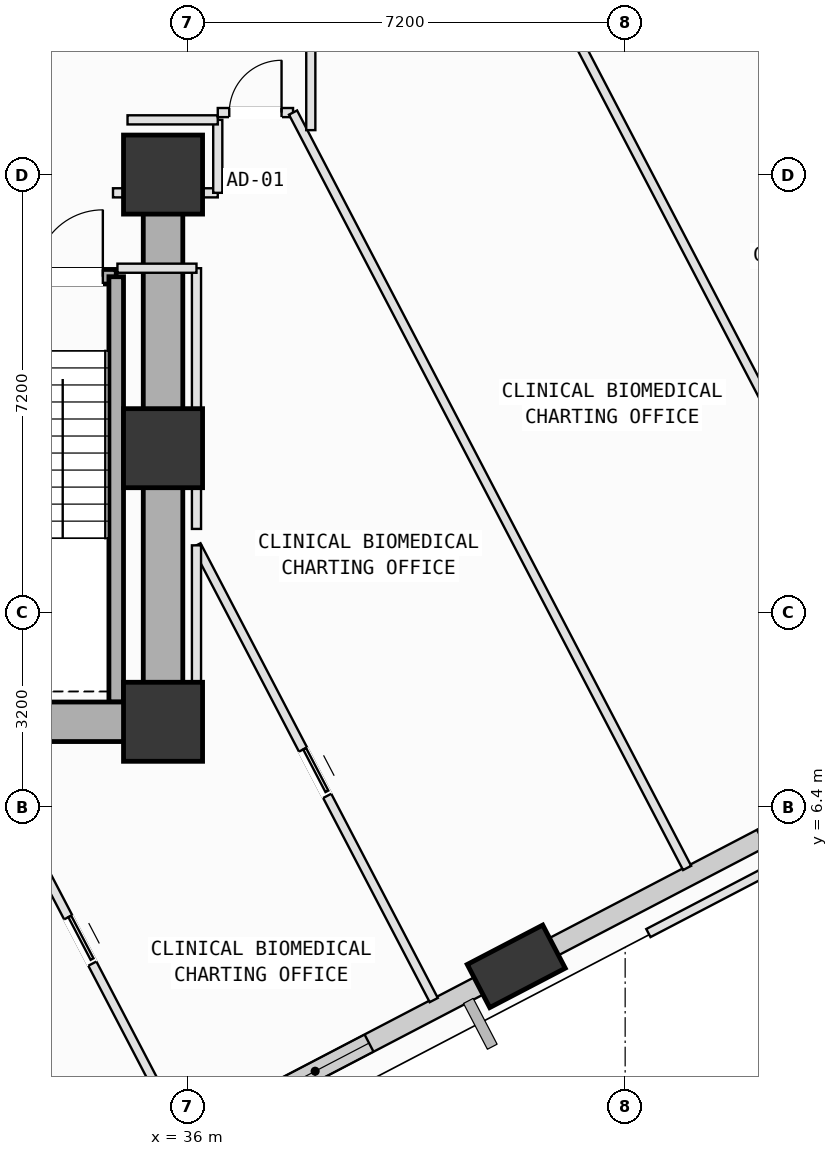
"""IFC4 building model, lengths in metres.
Left out: names, types, materials, properties, quantities, classifications, styles, units other than length and angle.
Written with IfcOpenShell. Run it as: python <this file> out.ifc"""

import sys

from ifc_helpers import new_model, si_unit, direction, frame, frame_2d, origin, origin_2d, place, context, subcontext, project, spatial, rectangle, extrude, element, fill, save


model = new_model("IFC4")
c1 = context("Model", 3, precision=1e-05, world=origin(), true_north=direction((0.0, 1.0)))
c2 = subcontext(c1, "Body", "Model", "MODEL_VIEW")
j1 = project(units=[si_unit("LENGTHUNIT", "METRE"), si_unit("PLANEANGLEUNIT", "RADIAN")], contexts=[c1])
p1 = place(None, origin())
s1 = spatial("IfcSite", under=j1, at=p1, CompositionType="ELEMENT")
p2 = place(p1, origin())
s2 = spatial("IfcBuilding", under=s1, at=p2, CompositionType="ELEMENT")
p3 = place(p2, frame((0.0, 0.0, 140.4)))
s3 = spatial("IfcBuildingStorey", under=s2, at=p3, CompositionType="ELEMENT", Elevation=140.4)
for number, where, z_axis, x_axis in (
    (1, (35.6, 7.8, 0.0), (0.0, 0.0, 1.0), (1.0, 0.0, 0.0)),
    (2, (35.6, 12.3, 0.0), (0.0, 0.0, 1.0), (1.0, 0.0, 0.0)),
    (3, (35.6, 16.8, 0.0), (0.0, 0.0, 1.0), (1.0, 0.0, 0.0)),
):
    element("IfcColumn", number, at=place(p3, frame(where, z_axis=z_axis, x_axis=x_axis)), inside=s3, PredefinedType="COLUMN", context=c2, shape_type="SweptSolid", body=[
        extrude(rectangle(XDim=1.3, YDim=1.3, at=origin_2d()), origin(), (0.0, 0.0, 1.0), 4.0),
    ])
p4 = place(p3, frame((41.409, 3.778, 0.002), z_axis=(0.086534580575, 0.032944951033, 0.995703970348), x_axis=(-0.745854703715, 0.664730498128, 0.042826694996)))
e4 = element("IfcColumn", 4, at=p4, inside=s3, PredefinedType="COLUMN", context=c2, shape_type="SweptSolid", body=[
    extrude(rectangle(XDim=1.4, YDim=0.8, at=origin_2d()), origin(), (0.0, 0.0, 1.0), 3.95),
])
p5 = place(p3, frame((41.133, 3.634, 0.0), z_axis=(0.0, 0.0, 1.0), x_axis=(-0.886602358558, -0.462532439726, 0.0)))
e5 = element("IfcWall", 5, at=p5, inside=s3, PredefinedType="SOLIDWALL", context=c2, shape_type="SweptSolid", body=[
    extrude(rectangle(XDim=6.214, YDim=0.32, at=frame_2d((3.107, 0.0))), origin(), (0.0, 0.0, 1.0), 3.085),
])
p6 = place(p5, frame((2.419, 0.0, 0.75)))
e6 = element("IfcOpeningElement", 6, at=p6, cuts=e5, PredefinedType="OPENING", context=c2, shape_type="SweptSolid", body=[
    extrude(rectangle(XDim=2.0, YDim=1.95, at=frame_2d((1.0, 0.975))), frame((0.0, 0.17, 0.0), z_axis=(0.0, -1.0, 0.0), x_axis=(1.0, 0.0, 0.0)), (0.0, 0.0, 1.0), 0.34),
])
p7 = place(p3, frame((47.517, 6.964, 0.0), z_axis=(0.0, 0.0, 1.0), x_axis=(-0.886603775461, -0.462529723734, 0.0)))
e7 = element("IfcWall", 7, at=p7, inside=s3, PredefinedType="SOLIDWALL", context=c2, shape_type="SweptSolid", body=[
    extrude(rectangle(XDim=6.209, YDim=0.32, at=frame_2d((3.104, 0.0))), origin(), (0.0, 0.0, 1.0), 3.085),
])
p8 = place(p7, frame((0.94, 0.0, 0.75)))
e8 = element("IfcOpeningElement", 8, at=p8, cuts=e7, PredefinedType="OPENING", context=c2, shape_type="SweptSolid", body=[
    extrude(rectangle(XDim=1.4, YDim=1.85, at=frame_2d((0.7, 0.925))), frame((0.0, 0.17, 0.0), z_axis=(0.0, -1.0, 0.0), x_axis=(1.0, 0.0, 0.0)), (0.0, 0.0, 1.0), 0.34),
])
p9 = place(p3, frame((31.37, 15.12, 0.0), z_axis=(0.0, 0.0, 1.0), x_axis=(1.0, 0.0, 0.0)))
e9 = element("IfcWall", 9, at=p9, inside=s3, PredefinedType="SOLIDWALL", context=c2, shape_type="SweptSolid", body=[
    extrude(rectangle(XDim=3.46, YDim=0.24, at=frame_2d((1.73, 0.0))), origin(), (0.0, 0.0, 1.0), 3.7),
])
p10 = place(p9, frame((2.14, 0.0, 0.0)))
e10 = element("IfcOpeningElement", 10, at=p10, cuts=e9, PredefinedType="OPENING", context=c2, shape_type="SweptSolid", body=[
    extrude(rectangle(XDim=1.1, YDim=2.15, at=frame_2d((0.55, 1.075))), frame((0.0, 0.13, 0.0), z_axis=(0.0, -1.0, 0.0), x_axis=(1.0, 0.0, 0.0)), (0.0, 0.0, 1.0), 0.26),
])
p11 = place(p3, frame((34.83, 15.12, 0.0), z_axis=(0.0, 0.0, 1.0), x_axis=(0.0, -1.0, 0.0)))
e11 = element("IfcWall", 11, at=p11, inside=s3, PredefinedType="SOLIDWALL", context=c2, shape_type="SweptSolid", body=[
    extrude(rectangle(XDim=6.995, YDim=0.24, at=frame_2d((3.498, 0.0))), origin(), (0.0, 0.0, 1.0), 3.7),
])
p12 = place(p3, frame((24.8, 7.8, 0.0), z_axis=(0.0, 0.0, 1.0), x_axis=(1.0, 0.0, 0.0)))
e12 = element("IfcWall", 12, at=p12, inside=s3, PredefinedType="SHEAR", context=c2, shape_type="SweptSolid", body=[
    extrude(rectangle(XDim=10.8, YDim=0.65, at=frame_2d((5.4, 0.0))), origin(), (0.0, 0.0, 1.0), 3.7),
])
p13 = place(p3, frame((35.6, 7.8, 0.0), z_axis=(0.0, 0.0, 1.0), x_axis=(0.0, 1.0, 0.0)))
e13 = element("IfcWall", 13, at=p13, inside=s3, PredefinedType="SHEAR", context=c2, shape_type="SweptSolid", body=[
    extrude(rectangle(XDim=9.0, YDim=0.65, at=frame_2d((4.5, 0.0))), origin(), (0.0, 0.0, 1.0), 3.7),
])
p14 = place(p3, frame((32.436, 7.658, 0.0), z_axis=(0.0, 0.0, 1.0), x_axis=(0.462656662388, -0.886537541646, 0.0)))
e14 = element("IfcWall", 14, at=p14, inside=s3, PredefinedType="PARTITIONING", context=c2, shape_type="SweptSolid", body=[
    extrude(rectangle(XDim=7.455, YDim=0.15, at=frame_2d((3.728, 0.0))), origin(), (0.0, 0.0, 1.0), 3.7),
])
p15 = place(p14, frame((3.467, 0.0, 0.0)))
e15 = element("IfcOpeningElement", 15, at=p15, cuts=e14, PredefinedType="OPENING", context=c2, shape_type="SweptSolid", body=[
    extrude(rectangle(XDim=0.86, YDim=2.06, at=frame_2d((0.43, 1.03))), frame((0.0, 0.085, 0.0), z_axis=(0.0, -1.0, 0.0), x_axis=(1.0, 0.0, 0.0)), (0.0, 0.0, 1.0), 0.17),
])
p16 = place(p3, frame((36.15, 10.702, 0.0), z_axis=(0.0, 0.0, 1.0), x_axis=(0.462566995769, -0.886584330126, 0.0)))
e16 = element("IfcWall", 16, at=p16, inside=s3, PredefinedType="PARTITIONING", context=c2, shape_type="SweptSolid", body=[
    extrude(rectangle(XDim=8.436, YDim=0.15, at=frame_2d((4.218, 0.0))), origin(), (0.0, 0.0, 1.0), 3.7),
])
p17 = place(p16, frame((3.788, 0.0, 0.0)))
e17 = element("IfcOpeningElement", 17, at=p17, cuts=e16, PredefinedType="OPENING", context=c2, shape_type="SweptSolid", body=[
    extrude(rectangle(XDim=0.86, YDim=2.06, at=frame_2d((0.43, 1.03))), frame((0.0, 0.085, 0.0), z_axis=(0.0, -1.0, 0.0), x_axis=(1.0, 0.0, 0.0)), (0.0, 0.0, 1.0), 0.17),
])
p18 = place(p3, frame((35.6, 7.5, 0.0), z_axis=(0.0, 0.0, 1.0), x_axis=(1.0, 0.0, 0.0)))
e18 = element("IfcWall", 18, at=p18, inside=s3, PredefinedType="PARTITIONING", context=c2, shape_type="SweptSolid", body=[
    extrude(rectangle(XDim=0.55, YDim=0.15, at=frame_2d((0.275, 0.0))), origin(), (0.0, 0.0, 1.0), 2.885),
])
p19 = place(p3, frame((36.15, 7.5, 0.0), z_axis=(0.0, 0.0, 1.0), x_axis=(0.0, 1.0, 0.0)))
e19 = element("IfcWall", 19, at=p19, inside=s3, PredefinedType="PARTITIONING", context=c2, shape_type="SweptSolid", body=[
    extrude(rectangle(XDim=3.202, YDim=0.15, at=frame_2d((1.601, 0.0))), origin(), (0.0, 0.0, 1.0), 3.7),
])
p20 = place(p3, frame((34.777, 16.5, 0.0), z_axis=(0.0, 0.0, 1.0), x_axis=(1.0, 0.0, 0.0)))
e20 = element("IfcWall", 20, at=p20, inside=s3, PredefinedType="PARTITIONING", context=c2, shape_type="SweptSolid", body=[
    extrude(rectangle(XDim=1.723, YDim=0.15, at=frame_2d((0.861, 0.0))), origin(), (0.0, 0.0, 1.0), 2.885),
])
p21 = place(p3, frame((36.5, 16.5, 0.0), z_axis=(0.0, 0.0, 1.0), x_axis=(0.0, 1.0, 0.0)))
e21 = element("IfcWall", 21, at=p21, inside=s3, PredefinedType="PARTITIONING", context=c2, shape_type="SweptSolid", body=[
    extrude(rectangle(XDim=1.2, YDim=0.15, at=frame_2d((0.6, 0.0))), origin(), (0.0, 0.0, 1.0), 3.7),
])
p22 = place(p3, frame((36.5, 17.7, 0.0), z_axis=(0.0, 0.0, 1.0), x_axis=(-1.0, 0.0, 0.0)))
e22 = element("IfcWall", 22, at=p22, inside=s3, PredefinedType="PARTITIONING", context=c2, shape_type="SweptSolid", body=[
    extrude(rectangle(XDim=1.484, YDim=0.15, at=frame_2d((0.742, 0.0))), origin(), (0.0, 0.0, 1.0), 3.7),
])
p23 = place(p3, frame((36.5, 17.82, 0.0), z_axis=(0.0, 0.0, 1.0), x_axis=(1.0, 0.0, 0.0)))
e23 = element("IfcWall", 23, at=p23, inside=s3, PredefinedType="PARTITIONING", context=c2, shape_type="SweptSolid", body=[
    extrude(rectangle(XDim=1.238, YDim=0.15, at=frame_2d((0.619, 0.0))), origin(), (0.0, 0.0, 1.0), 2.885),
])
p24 = place(p23, frame((0.189, 0.0, 0.0)))
e24 = element("IfcOpeningElement", 24, at=p24, cuts=e23, PredefinedType="OPENING", context=c2, shape_type="SweptSolid", body=[
    extrude(rectangle(XDim=0.86, YDim=2.06, at=frame_2d((0.43, 1.03))), frame((0.0, 0.085, 0.0), z_axis=(0.0, -1.0, 0.0), x_axis=(1.0, 0.0, 0.0)), (0.0, 0.0, 1.0), 0.17),
])
p25 = place(p3, frame((37.738, 17.82, 0.0), z_axis=(0.0, 0.0, 1.0), x_axis=(0.462500508859, -0.886619015872, 0.0)))
e25 = element("IfcWall", 25, at=p25, inside=s3, PredefinedType="PARTITIONING", context=c2, shape_type="SweptSolid", body=[
    extrude(rectangle(XDim=14.013, YDim=0.15, at=frame_2d((7.006, 0.0))), origin(), (0.0, 0.0, 1.0), 3.7),
])
p26 = place(p3, frame((42.118, 3.889, 0.0), z_axis=(0.0, 0.0, 1.0), x_axis=(-0.886409168766, -0.462902565911, 0.0)))
e26 = element("IfcWall", 26, at=p26, inside=s3, PredefinedType="PARTITIONING", context=c2, shape_type="SweptSolid", body=[
    extrude(rectangle(XDim=0.991, YDim=0.15, at=frame_2d((0.496, 0.0))), origin(), (0.0, 0.0, 1.0), 3.085),
])
p27 = place(p3, frame((36.15, 10.972, 0.0), z_axis=(0.0, 0.0, 1.0), x_axis=(0.0, 1.0, 0.0)))
e27 = element("IfcWall", 27, at=p27, inside=s3, PredefinedType="PARTITIONING", context=c2, shape_type="SweptSolid", body=[
    extrude(rectangle(XDim=4.288, YDim=0.15, at=frame_2d((2.144, 0.0))), origin(), (0.0, 0.0, 1.0), 3.7),
])
p28 = place(p3, frame((36.15, 15.26, 0.0), z_axis=(0.0, 0.0, 1.0), x_axis=(-1.0, 0.0, 0.0)))
e28 = element("IfcWall", 28, at=p28, inside=s3, PredefinedType="PARTITIONING", context=c2, shape_type="SweptSolid", body=[
    extrude(rectangle(XDim=1.3, YDim=0.15, at=frame_2d((0.65, 0.0))), origin(), (0.0, 0.0, 1.0), 3.7),
])
p29 = place(p3, frame((38.03, 17.531, 0.0), z_axis=(0.0, 0.0, 1.0), x_axis=(0.0, 1.0, 0.0)))
e29 = element("IfcWall", 29, at=p29, inside=s3, PredefinedType="PARTITIONING", context=c2, shape_type="SweptSolid", body=[
    extrude(rectangle(XDim=1.741, YDim=0.15, at=frame_2d((0.871, 0.0))), origin(), (0.0, 0.0, 1.0), 3.7),
])
p30 = place(p3, frame((41.372, 21.015, 0.0), z_axis=(0.0, 0.0, 1.0), x_axis=(0.46252584091, -0.88660580107, 0.0)))
e30 = element("IfcWall", 30, at=p30, inside=s3, PredefinedType="PARTITIONING", context=c2, shape_type="SweptSolid", body=[
    extrude(rectangle(XDim=15.164, YDim=0.15, at=frame_2d((7.582, 0.0))), origin(), (0.0, 0.0, 1.0), 3.7),
])
p31 = place(p3, frame((49.07, 7.188, 0.0), z_axis=(0.0, 0.0, 1.0), x_axis=(-0.886603833565, -0.462529612359, 0.0)))
e31 = element("IfcWall", 31, at=p31, inside=s3, PredefinedType="PARTITIONING", context=c2, shape_type="SweptSolid", body=[
    extrude(rectangle(XDim=6.19, YDim=0.15, at=frame_2d((3.095, 0.0))), origin(), (0.0, 0.0, 1.0), 3.7),
])
p32 = place(p6, origin())
e32 = element("IfcWindow", 32, at=p32, inside=s3, PartitioningType="SINGLE_PANEL", PredefinedType="WINDOW", context=c2, shape_type="SweptSolid", body=[
    extrude(rectangle(XDim=2.0, YDim=1.95, at=frame_2d((1.0, 0.975))), frame((0.0, 0.03, 0.0), z_axis=(0.0, -1.0, 0.0), x_axis=(1.0, 0.0, 0.0)), (0.0, 0.0, 1.0), 0.06),
])
fill(e6, e32)
p33 = place(p10, origin())
e33 = element("IfcDoor", 33, at=p33, inside=s3, OperationType="SINGLE_SWING_RIGHT", PredefinedType="DOOR", context=c2, shape_type="SweptSolid", body=[
    extrude(rectangle(XDim=1.1, YDim=2.15, at=frame_2d((0.55, 1.075))), frame((0.0, 0.025, 0.0), z_axis=(0.0, -1.0, 0.0), x_axis=(1.0, 0.0, 0.0)), (0.0, 0.0, 1.0), 0.05),
])
fill(e10, e33)
p34 = place(p24, origin())
e34 = element("IfcDoor", 34, at=p34, inside=s3, OperationType="SINGLE_SWING_RIGHT", PredefinedType="DOOR", context=c2, shape_type="SweptSolid", body=[
    extrude(rectangle(XDim=0.86, YDim=2.06, at=frame_2d((0.43, 1.03))), frame((0.0, 0.025, 0.0), z_axis=(0.0, -1.0, 0.0), x_axis=(1.0, 0.0, 0.0)), (0.0, 0.0, 1.0), 0.05),
])
fill(e24, e34)
p35 = place(p17, origin())
e35 = element("IfcDoor", 35, at=p35, inside=s3, OperationType="SLIDING_TO_LEFT", PredefinedType="DOOR", context=c2, shape_type="SweptSolid", body=[
    extrude(rectangle(XDim=0.86, YDim=2.06, at=frame_2d((0.43, 1.03))), frame((0.0, 0.025, 0.0), z_axis=(0.0, -1.0, 0.0), x_axis=(1.0, 0.0, 0.0)), (0.0, 0.0, 1.0), 0.05),
])
fill(e17, e35)
p36 = place(p15, origin())
e36 = element("IfcDoor", 36, at=p36, inside=s3, OperationType="SLIDING_TO_LEFT", PredefinedType="DOOR", context=c2, shape_type="SweptSolid", body=[
    extrude(rectangle(XDim=0.86, YDim=2.06, at=frame_2d((0.43, 1.03))), frame((0.0, 0.025, 0.0), z_axis=(0.0, -1.0, 0.0), x_axis=(1.0, 0.0, 0.0)), (0.0, 0.0, 1.0), 0.05),
])
fill(e15, e36)
save(model, sys.argv[1])
